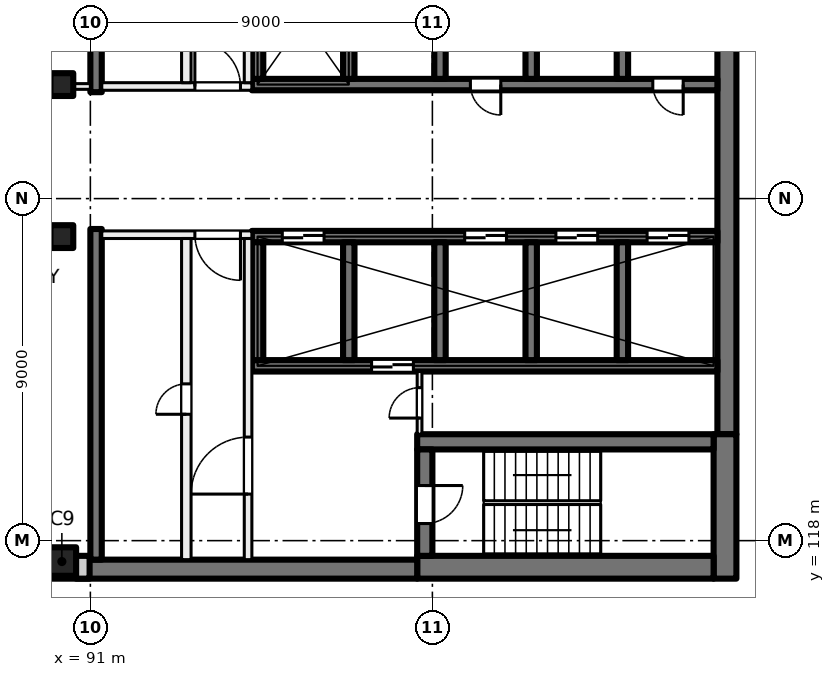
"""IFC4 building model, lengths in metres.
Left out: names, types, materials, properties, quantities, classifications, styles, units other than length and angle.
Written with IfcOpenShell. Run it as: python <this file> out.ifc"""

import sys

from ifc_helpers import new_model, si_unit, direction, frame, frame_2d, origin, origin_2d, place, context, subcontext, project, spatial, rectangle, extrude, element, fill, save


model = new_model("IFC4")
c1 = context("Model", 3, precision=1e-05, world=origin(), true_north=direction((0.0, 1.0)))
c2 = subcontext(c1, "Body", "Model", "MODEL_VIEW")
j1 = project(units=[si_unit("LENGTHUNIT", "METRE"), si_unit("PLANEANGLEUNIT", "RADIAN")], contexts=[c1])
p1 = place(None, origin())
s1 = spatial("IfcSite", under=j1, at=p1, CompositionType="ELEMENT")
p2 = place(p1, origin())
s2 = spatial("IfcBuilding", under=s1, at=p2, CompositionType="ELEMENT")
p3 = place(p2, frame((0.0, 0.0, 204.0)))
s3 = spatial("IfcBuildingStorey", under=s2, at=p3, CompositionType="ELEMENT", Elevation=204.0)
for number, where, z_axis, x_axis in (
    (1, (90.25, 130.0, 0.0), (0.0, 0.0, 1.0), (1.0, 0.0, 0.0)),
    (2, (90.25, 126.0, 0.0), (0.0, 0.0, 1.0), (1.0, 0.0, 0.0)),
):
    element("IfcColumn", number, at=place(p3, frame(where, z_axis=z_axis, x_axis=x_axis)), inside=s3, PredefinedType="COLUMN", context=c2, shape_type="SweptSolid", body=[
        extrude(rectangle(XDim=0.6, YDim=0.6, at=origin_2d()), origin(), (0.0, 0.0, 1.0), 4.0),
    ])
p4 = place(p3, frame((90.25, 117.45, 0.0), z_axis=(0.0, 0.0, 1.0), x_axis=(1.0, 0.0, 0.0)))
e3 = element("IfcColumn", 3, at=p4, inside=s3, PredefinedType="COLUMN", context=c2, shape_type="SweptSolid", body=[
    extrude(rectangle(XDim=0.75, YDim=0.75, at=origin_2d()), origin(), (0.0, 0.0, 1.0), 4.0),
])
p5 = place(p3, frame((107.75, 135.2, 0.0), z_axis=(0.0, 0.0, 1.0), x_axis=(0.0, -1.0, 0.0)))
e4 = element("IfcWall", 4, at=p5, inside=s3, PredefinedType="SHEAR", context=c2, shape_type="SweptSolid", body=[
    extrude(rectangle(XDim=14.4, YDim=0.5, at=frame_2d((7.2, 0.0))), origin(), (0.0, 0.0, 1.0), 4.0),
])
p6 = place(p3, frame((107.7, 120.8, 0.0), z_axis=(0.0, 0.0, 1.0), x_axis=(0.0, -1.0, 0.0)))
e5 = element("IfcWall", 5, at=p6, inside=s3, PredefinedType="SHEAR", context=c2, shape_type="SweptSolid", body=[
    extrude(rectangle(XDim=3.8, YDim=0.6, at=frame_2d((1.9, 0.0))), origin(), (0.0, 0.0, 1.0), 4.0),
])
p7 = place(p3, frame((107.4, 117.3, 0.0), z_axis=(0.0, 0.0, 1.0), x_axis=(-1.0, 0.0, 0.0)))
e6 = element("IfcWall", 6, at=p7, inside=s3, PredefinedType="SHEAR", context=c2, shape_type="SweptSolid", body=[
    extrude(rectangle(XDim=7.8, YDim=0.6, at=frame_2d((3.9, 0.0))), origin(), (0.0, 0.0, 1.0), 4.0),
])
p8 = place(p3, frame((99.6, 117.25, 0.0), z_axis=(0.0, 0.0, 1.0), x_axis=(-1.0, 0.0, 0.0)))
e7 = element("IfcWall", 7, at=p8, inside=s3, PredefinedType="SHEAR", context=c2, shape_type="SweptSolid", body=[
    extrude(rectangle(XDim=8.975, YDim=0.5, at=frame_2d((4.488, 0.0))), origin(), (0.0, 0.0, 1.0), 4.0),
])
p9 = place(p3, frame((107.4, 120.6, 0.0), z_axis=(0.0, 0.0, 1.0), x_axis=(-1.0, 0.0, 0.0)))
e8 = element("IfcWall", 8, at=p9, inside=s3, PredefinedType="SHEAR", context=c2, shape_type="SweptSolid", body=[
    extrude(rectangle(XDim=7.8, YDim=0.4, at=frame_2d((3.9, 0.0))), origin(), (0.0, 0.0, 1.0), 4.0),
])
p10 = place(p3, frame((99.8, 120.4, 0.0), z_axis=(0.0, 0.0, 1.0), x_axis=(0.0, -1.0, 0.0)))
e9 = element("IfcWall", 9, at=p10, inside=s3, PredefinedType="SHEAR", context=c2, shape_type="SweptSolid", body=[
    extrude(rectangle(XDim=2.8, YDim=0.4, at=frame_2d((1.4, 0.0))), origin(), (0.0, 0.0, 1.0), 4.0),
])
p11 = place(p10, frame((0.95, 0.0, 0.0)))
e10 = element("IfcOpeningElement", 10, at=p11, cuts=e9, PredefinedType="OPENING", context=c2, shape_type="SweptSolid", body=[
    extrude(rectangle(XDim=1.0, YDim=2.1, at=frame_2d((0.5, 1.05))), frame((0.0, 0.21, 0.0), z_axis=(0.0, -1.0, 0.0), x_axis=(1.0, 0.0, 0.0)), (0.0, 0.0, 1.0), 0.42),
])
p12 = place(p3, frame((107.5, 130.0, 0.0), z_axis=(0.0, 0.0, 1.0), x_axis=(-1.0, 0.0, 0.0)))
e11 = element("IfcWall", 11, at=p12, inside=s3, PredefinedType="SHEAR", context=c2, shape_type="SweptSolid", body=[
    extrude(rectangle(XDim=12.25, YDim=0.3, at=frame_2d((6.125, 0.0))), origin(), (0.0, 0.0, 1.0), 4.0),
])
p13 = place(p12, frame((0.9, 0.0, 0.0)))
e12 = element("IfcOpeningElement", 12, at=p13, cuts=e11, PredefinedType="OPENING", context=c2, shape_type="SweptSolid", body=[
    extrude(rectangle(XDim=0.8, YDim=2.1, at=frame_2d((0.4, 1.05))), frame((0.0, 0.16, 0.0), z_axis=(0.0, -1.0, 0.0), x_axis=(1.0, 0.0, 0.0)), (0.0, 0.0, 1.0), 0.32),
])
p14 = place(p12, frame((5.7, 0.0, 0.0)))
e13 = element("IfcOpeningElement", 13, at=p14, cuts=e11, PredefinedType="OPENING", context=c2, shape_type="SweptSolid", body=[
    extrude(rectangle(XDim=0.8, YDim=2.1, at=frame_2d((0.4, 1.05))), frame((0.0, 0.16, 0.0), z_axis=(0.0, -1.0, 0.0), x_axis=(1.0, 0.0, 0.0)), (0.0, 0.0, 1.0), 0.32),
])
for number, where, z_axis, x_axis in (
    (14, (105.0, 133.25, 0.0), (0.0, 0.0, 1.0), (0.0, -1.0, 0.0)),
    (15, (102.6, 133.25, 0.0), (0.0, 0.0, 1.0), (0.0, -1.0, 0.0)),
    (16, (100.2, 133.25, 0.0), (0.0, 0.0, 1.0), (0.0, -1.0, 0.0)),
    (17, (97.8, 133.25, 0.0), (0.0, 0.0, 1.0), (0.0, -1.0, 0.0)),
    (18, (95.4, 133.25, 0.0), (0.0, 0.0, 1.0), (0.0, -1.0, 0.0)),
):
    element("IfcWall", number, at=place(p3, frame(where, z_axis=z_axis, x_axis=x_axis)), inside=s3, PredefinedType="SHEAR", context=c2, shape_type="SweptSolid", body=[
        extrude(rectangle(XDim=3.1, YDim=0.3, at=frame_2d((1.55, 0.0))), origin(), (0.0, 0.0, 1.0), 4.0),
    ])
p15 = place(p3, frame((107.5, 126.0, 0.0), z_axis=(0.0, 0.0, 1.0), x_axis=(-1.0, 0.0, 0.0)))
e19 = element("IfcWall", 19, at=p15, inside=s3, PredefinedType="SHEAR", context=c2, shape_type="SweptSolid", body=[
    extrude(rectangle(XDim=12.25, YDim=0.3, at=frame_2d((6.125, 0.0))), origin(), (0.0, 0.0, 1.0), 4.0),
])
p16 = place(p15, frame((0.75, 0.0, 0.0)))
e20 = element("IfcOpeningElement", 20, at=p16, cuts=e19, PredefinedType="OPENING", context=c2, shape_type="SweptSolid", body=[
    extrude(rectangle(XDim=1.1, YDim=2.1, at=frame_2d((0.55, 1.05))), frame((0.0, 0.16, 0.0), z_axis=(0.0, -1.0, 0.0), x_axis=(1.0, 0.0, 0.0)), (0.0, 0.0, 1.0), 0.32),
])
p17 = place(p15, frame((3.15, 0.0, 0.0)))
e21 = element("IfcOpeningElement", 21, at=p17, cuts=e19, PredefinedType="OPENING", context=c2, shape_type="SweptSolid", body=[
    extrude(rectangle(XDim=1.1, YDim=2.1, at=frame_2d((0.55, 1.05))), frame((0.0, 0.16, 0.0), z_axis=(0.0, -1.0, 0.0), x_axis=(1.0, 0.0, 0.0)), (0.0, 0.0, 1.0), 0.32),
])
p18 = place(p15, frame((5.55, 0.0, 0.0)))
e22 = element("IfcOpeningElement", 22, at=p18, cuts=e19, PredefinedType="OPENING", context=c2, shape_type="SweptSolid", body=[
    extrude(rectangle(XDim=1.1, YDim=2.1, at=frame_2d((0.55, 1.05))), frame((0.0, 0.16, 0.0), z_axis=(0.0, -1.0, 0.0), x_axis=(1.0, 0.0, 0.0)), (0.0, 0.0, 1.0), 0.32),
])
p19 = place(p15, frame((10.35, 0.0, 0.0)))
e23 = element("IfcOpeningElement", 23, at=p19, cuts=e19, PredefinedType="OPENING", context=c2, shape_type="SweptSolid", body=[
    extrude(rectangle(XDim=1.1, YDim=2.1, at=frame_2d((0.55, 1.05))), frame((0.0, 0.16, 0.0), z_axis=(0.0, -1.0, 0.0), x_axis=(1.0, 0.0, 0.0)), (0.0, 0.0, 1.0), 0.32),
])
p20 = place(p3, frame((107.5, 122.6, 0.0), z_axis=(0.0, 0.0, 1.0), x_axis=(-1.0, 0.0, 0.0)))
e24 = element("IfcWall", 24, at=p20, inside=s3, PredefinedType="SHEAR", context=c2, shape_type="SweptSolid", body=[
    extrude(rectangle(XDim=12.25, YDim=0.3, at=frame_2d((6.125, 0.0))), origin(), (0.0, 0.0, 1.0), 4.0),
])
p21 = place(p20, frame((8.0, 0.0, 0.0)))
e25 = element("IfcOpeningElement", 25, at=p21, cuts=e24, PredefinedType="OPENING", context=c2, shape_type="SweptSolid", body=[
    extrude(rectangle(XDim=1.1, YDim=2.1, at=frame_2d((0.55, 1.05))), frame((0.0, 0.16, 0.0), z_axis=(0.0, -1.0, 0.0), x_axis=(1.0, 0.0, 0.0)), (0.0, 0.0, 1.0), 0.32),
])
for number, where, z_axis, x_axis in (
    (26, (105.0, 125.85, 0.0), (0.0, 0.0, 1.0), (0.0, -1.0, 0.0)),
    (27, (102.6, 125.85, 0.0), (0.0, 0.0, 1.0), (0.0, -1.0, 0.0)),
    (28, (100.2, 125.85, 0.0), (0.0, 0.0, 1.0), (0.0, -1.0, 0.0)),
    (29, (97.8, 125.85, 0.0), (0.0, 0.0, 1.0), (0.0, -1.0, 0.0)),
    (30, (95.4, 125.85, 0.0), (0.0, 0.0, 1.0), (0.0, -1.0, 0.0)),
):
    element("IfcWall", number, at=place(p3, frame(where, z_axis=z_axis, x_axis=x_axis)), inside=s3, PredefinedType="SHEAR", context=c2, shape_type="SweptSolid", body=[
        extrude(rectangle(XDim=3.1, YDim=0.3, at=frame_2d((1.55, 0.0))), origin(), (0.0, 0.0, 1.0), 4.0),
    ])
for number, where, z_axis, x_axis in (
    (31, (91.15, 138.5, 0.0), (0.0, 0.0, 1.0), (0.0, -1.0, 0.0)),
    (32, (91.15, 126.2, 0.0), (0.0, 0.0, 1.0), (0.0, -1.0, 0.0)),
):
    element("IfcWall", number, at=place(p3, frame(where, z_axis=z_axis, x_axis=x_axis)), inside=s3, PredefinedType="SHEAR", context=c2, shape_type="SweptSolid", body=[
        extrude(rectangle(XDim=8.7, YDim=0.3, at=frame_2d((4.35, 0.0))), origin(), (0.0, 0.0, 1.0), 4.0),
    ])
p22 = place(p3, frame((90.98, 117.3, 0.0), z_axis=(0.0, 0.0, 1.0), x_axis=(-1.0, 0.0, 0.0)))
e33 = element("IfcWall", 33, at=p22, inside=s3, PredefinedType="SOLIDWALL", context=c2, shape_type="SweptSolid", body=[
    extrude(rectangle(XDim=33.745, YDim=0.6, at=frame_2d((16.873, 0.0))), origin(), (0.0, 0.0, 1.0), 3.625),
])
p23 = place(p22, frame((1.48, 0.0, 0.9)))
e34 = element("IfcOpeningElement", 34, at=p23, cuts=e33, PredefinedType="OPENING", context=c2, shape_type="SweptSolid", body=[
    extrude(rectangle(XDim=3.0, YDim=2.4, at=frame_2d((1.5, 1.2))), frame((0.0, 0.31, 0.0), z_axis=(0.0, -1.0, 0.0), x_axis=(1.0, 0.0, 0.0)), (0.0, 0.0, 1.0), 0.62),
])
p24 = place(p22, frame((5.98, 0.0, 0.9)))
e35 = element("IfcOpeningElement", 35, at=p24, cuts=e33, PredefinedType="OPENING", context=c2, shape_type="SweptSolid", body=[
    extrude(rectangle(XDim=3.0, YDim=2.4, at=frame_2d((1.5, 1.2))), frame((0.0, 0.31, 0.0), z_axis=(0.0, -1.0, 0.0), x_axis=(1.0, 0.0, 0.0)), (0.0, 0.0, 1.0), 0.62),
])
p25 = place(p22, frame((10.48, 0.0, 0.9)))
e36 = element("IfcOpeningElement", 36, at=p25, cuts=e33, PredefinedType="OPENING", context=c2, shape_type="SweptSolid", body=[
    extrude(rectangle(XDim=3.0, YDim=2.4, at=frame_2d((1.5, 1.2))), frame((0.0, 0.31, 0.0), z_axis=(0.0, -1.0, 0.0), x_axis=(1.0, 0.0, 0.0)), (0.0, 0.0, 1.0), 0.62),
])
p26 = place(p22, frame((14.98, 0.0, 0.9)))
e37 = element("IfcOpeningElement", 37, at=p26, cuts=e33, PredefinedType="OPENING", context=c2, shape_type="SweptSolid", body=[
    extrude(rectangle(XDim=3.0, YDim=2.4, at=frame_2d((1.5, 1.2))), frame((0.0, 0.31, 0.0), z_axis=(0.0, -1.0, 0.0), x_axis=(1.0, 0.0, 0.0)), (0.0, 0.0, 1.0), 0.62),
])
p27 = place(p22, frame((20.08, 0.0, 0.0)))
e38 = element("IfcOpeningElement", 38, at=p27, cuts=e33, PredefinedType="OPENING", context=c2, shape_type="SweptSolid", body=[
    extrude(rectangle(XDim=1.8, YDim=2.4, at=frame_2d((0.9, 1.2))), frame((0.0, 0.31, 0.0), z_axis=(0.0, -1.0, 0.0), x_axis=(1.0, 0.0, 0.0)), (0.0, 0.0, 1.0), 0.62),
])
p28 = place(p22, frame((23.98, 0.0, 0.9)))
e39 = element("IfcOpeningElement", 39, at=p28, cuts=e33, PredefinedType="OPENING", context=c2, shape_type="SweptSolid", body=[
    extrude(rectangle(XDim=3.0, YDim=2.4, at=frame_2d((1.5, 1.2))), frame((0.0, 0.31, 0.0), z_axis=(0.0, -1.0, 0.0), x_axis=(1.0, 0.0, 0.0)), (0.0, 0.0, 1.0), 0.62),
])
p29 = place(p22, frame((28.48, 0.0, 0.9)))
e40 = element("IfcOpeningElement", 40, at=p29, cuts=e33, PredefinedType="OPENING", context=c2, shape_type="SweptSolid", body=[
    extrude(rectangle(XDim=3.0, YDim=2.4, at=frame_2d((1.5, 1.2))), frame((0.0, 0.31, 0.0), z_axis=(0.0, -1.0, 0.0), x_axis=(1.0, 0.0, 0.0)), (0.0, 0.0, 1.0), 0.62),
])
p30 = place(p3, frame((95.25, 126.05, 0.0), z_axis=(0.0, 0.0, 1.0), x_axis=(-1.0, 0.0, 0.0)))
e41 = element("IfcWall", 41, at=p30, inside=s3, PredefinedType="PARTITIONING", context=c2, shape_type="SweptSolid", body=[
    extrude(rectangle(XDim=3.95, YDim=0.2, at=frame_2d((1.975, 0.0))), origin(), (0.0, 0.0, 1.0), 3.625),
])
p31 = place(p30, frame((0.3, 0.0, 0.0)))
e42 = element("IfcOpeningElement", 42, at=p31, cuts=e41, PredefinedType="OPENING", context=c2, shape_type="SweptSolid", body=[
    extrude(rectangle(XDim=1.2, YDim=2.1, at=frame_2d((0.6, 1.05))), frame((0.0, 0.11, 0.0), z_axis=(0.0, -1.0, 0.0), x_axis=(1.0, 0.0, 0.0)), (0.0, 0.0, 1.0), 0.22),
])
p32 = place(p3, frame((95.15, 117.5, 0.0), z_axis=(0.0, 0.0, 1.0), x_axis=(0.0, 1.0, 0.0)))
e43 = element("IfcWall", 43, at=p32, inside=s3, PredefinedType="PARTITIONING", context=c2, shape_type="SweptSolid", body=[
    extrude(rectangle(XDim=8.45, YDim=0.2, at=frame_2d((4.225, 0.0))), origin(), (0.0, 0.0, 1.0), 3.625),
])
p33 = place(p32, frame((1.725, 0.0, 0.0)))
e44 = element("IfcOpeningElement", 44, at=p33, cuts=e43, PredefinedType="OPENING", context=c2, shape_type="SweptSolid", body=[
    extrude(rectangle(XDim=1.5, YDim=2.1, at=frame_2d((0.75, 1.05))), frame((0.0, 0.11, 0.0), z_axis=(0.0, -1.0, 0.0), x_axis=(1.0, 0.0, 0.0)), (0.0, 0.0, 1.0), 0.22),
])
p34 = place(p3, frame((93.525, 117.5, 0.0), z_axis=(0.0, 0.0, 1.0), x_axis=(0.0, 1.0, 0.0)))
e45 = element("IfcWall", 45, at=p34, inside=s3, PredefinedType="PARTITIONING", context=c2, shape_type="SweptSolid", body=[
    extrude(rectangle(XDim=8.45, YDim=0.25, at=frame_2d((4.225, 0.0))), origin(), (0.0, 0.0, 1.0), 3.625),
])
p35 = place(p34, frame((3.825, 0.0, 0.0)))
e46 = element("IfcOpeningElement", 46, at=p35, cuts=e45, PredefinedType="OPENING", context=c2, shape_type="SweptSolid", body=[
    extrude(rectangle(XDim=0.8, YDim=2.1, at=frame_2d((0.4, 1.05))), frame((0.0, 0.135, 0.0), z_axis=(0.0, -1.0, 0.0), x_axis=(1.0, 0.0, 0.0)), (0.0, 0.0, 1.0), 0.27),
])
p36 = place(p3, frame((99.663, 120.8, 0.0), z_axis=(0.0, 0.0, 1.0), x_axis=(0.0, 1.0, 0.0)))
e47 = element("IfcWall", 47, at=p36, inside=s3, PredefinedType="PARTITIONING", context=c2, shape_type="SweptSolid", body=[
    extrude(rectangle(XDim=1.65, YDim=0.125, at=frame_2d((0.825, 0.0))), origin(), (0.0, 0.0, 1.0), 3.625),
])
p37 = place(p36, frame((0.425, 0.0, 0.0)))
e48 = element("IfcOpeningElement", 48, at=p37, cuts=e47, PredefinedType="OPENING", context=c2, shape_type="SweptSolid", body=[
    extrude(rectangle(XDim=0.8, YDim=2.1, at=frame_2d((0.4, 1.05))), frame((0.0, 0.073, 0.0), z_axis=(0.0, -1.0, 0.0), x_axis=(1.0, 0.0, 0.0)), (0.0, 0.0, 1.0), 0.145),
])
p38 = place(p3, frame((91.3, 129.95, 0.0), z_axis=(0.0, 0.0, 1.0), x_axis=(1.0, 0.0, 0.0)))
e49 = element("IfcWall", 49, at=p38, inside=s3, PredefinedType="PARTITIONING", context=c2, shape_type="SweptSolid", body=[
    extrude(rectangle(XDim=3.95, YDim=0.2, at=frame_2d((1.975, 0.0))), origin(), (0.0, 0.0, 1.0), 3.625),
])
p39 = place(p38, frame((2.45, 0.0, 0.0)))
e50 = element("IfcOpeningElement", 50, at=p39, cuts=e49, PredefinedType="OPENING", context=c2, shape_type="SweptSolid", body=[
    extrude(rectangle(XDim=1.2, YDim=2.1, at=frame_2d((0.6, 1.05))), frame((0.0, 0.11, 0.0), z_axis=(0.0, -1.0, 0.0), x_axis=(1.0, 0.0, 0.0)), (0.0, 0.0, 1.0), 0.22),
])
p40 = place(p3, frame((95.15, 130.05, 0.0), z_axis=(0.0, 0.0, 1.0), x_axis=(0.0, 1.0, 0.0)))
e51 = element("IfcWall", 51, at=p40, inside=s3, PredefinedType="PARTITIONING", context=c2, shape_type="SweptSolid", body=[
    extrude(rectangle(XDim=8.45, YDim=0.2, at=frame_2d((4.225, 0.0))), origin(), (0.0, 0.0, 1.0), 3.625),
])
p41 = place(p40, frame((5.225, 0.0, 0.0)))
e52 = element("IfcOpeningElement", 52, at=p41, cuts=e51, PredefinedType="OPENING", context=c2, shape_type="SweptSolid", body=[
    extrude(rectangle(XDim=1.5, YDim=2.1, at=frame_2d((0.75, 1.05))), frame((0.0, 0.11, 0.0), z_axis=(0.0, -1.0, 0.0), x_axis=(1.0, 0.0, 0.0)), (0.0, 0.0, 1.0), 0.22),
])
p42 = place(p3, frame((93.525, 130.05, 0.0), z_axis=(0.0, 0.0, 1.0), x_axis=(0.0, 1.0, 0.0)))
e53 = element("IfcWall", 53, at=p42, inside=s3, PredefinedType="PARTITIONING", context=c2, shape_type="SweptSolid", body=[
    extrude(rectangle(XDim=8.45, YDim=0.25, at=frame_2d((4.225, 0.0))), origin(), (0.0, 0.0, 1.0), 3.625),
])
p43 = place(p42, frame((3.825, 0.0, 0.0)))
e54 = element("IfcOpeningElement", 54, at=p43, cuts=e53, PredefinedType="OPENING", context=c2, shape_type="SweptSolid", body=[
    extrude(rectangle(XDim=0.8, YDim=2.1, at=frame_2d((0.4, 1.05))), frame((0.0, 0.135, 0.0), z_axis=(0.0, -1.0, 0.0), x_axis=(1.0, 0.0, 0.0)), (0.0, 0.0, 1.0), 0.27),
])
p44 = place(p3, frame((85.825, 129.95, 0.0), z_axis=(0.0, 0.0, 1.0), x_axis=(1.0, 0.0, 0.0)))
e55 = element("IfcWall", 55, at=p44, inside=s3, PredefinedType="PARTITIONING", context=c2, shape_type="SweptSolid", body=[
    extrude(rectangle(XDim=5.175, YDim=0.15, at=frame_2d((2.587, 0.0))), origin(), (0.0, 0.0, 1.0), 3.625),
])
p45 = place(p44, frame((2.077, 0.0, 0.0)))
e56 = element("IfcOpeningElement", 56, at=p45, cuts=e55, PredefinedType="OPENING", context=c2, shape_type="SweptSolid", body=[
    extrude(rectangle(XDim=1.0, YDim=2.1, at=frame_2d((0.5, 1.05))), frame((0.0, 0.085, 0.0), z_axis=(0.0, -1.0, 0.0), x_axis=(1.0, 0.0, 0.0)), (0.0, 0.0, 1.0), 0.17),
])
p46 = place(p16, origin())
e57 = element("IfcDoor", 57, at=p46, inside=s3, OperationType="DOUBLE_DOOR_SLIDING", PredefinedType="DOOR", context=c2, shape_type="SweptSolid", body=[
    extrude(rectangle(XDim=1.1, YDim=2.1, at=frame_2d((0.55, 1.05))), frame((0.0, 0.025, 0.0), z_axis=(0.0, -1.0, 0.0), x_axis=(1.0, 0.0, 0.0)), (0.0, 0.0, 1.0), 0.05),
])
fill(e20, e57)
p47 = place(p17, origin())
e58 = element("IfcDoor", 58, at=p47, inside=s3, OperationType="DOUBLE_DOOR_SLIDING", PredefinedType="DOOR", context=c2, shape_type="SweptSolid", body=[
    extrude(rectangle(XDim=1.1, YDim=2.1, at=frame_2d((0.55, 1.05))), frame((0.0, 0.025, 0.0), z_axis=(0.0, -1.0, 0.0), x_axis=(1.0, 0.0, 0.0)), (0.0, 0.0, 1.0), 0.05),
])
fill(e21, e58)
p48 = place(p18, origin())
e59 = element("IfcDoor", 59, at=p48, inside=s3, OperationType="DOUBLE_DOOR_SLIDING", PredefinedType="DOOR", context=c2, shape_type="SweptSolid", body=[
    extrude(rectangle(XDim=1.1, YDim=2.1, at=frame_2d((0.55, 1.05))), frame((0.0, 0.025, 0.0), z_axis=(0.0, -1.0, 0.0), x_axis=(1.0, 0.0, 0.0)), (0.0, 0.0, 1.0), 0.05),
])
fill(e22, e59)
p49 = place(p19, origin())
e60 = element("IfcDoor", 60, at=p49, inside=s3, OperationType="DOUBLE_DOOR_SLIDING", PredefinedType="DOOR", context=c2, shape_type="SweptSolid", body=[
    extrude(rectangle(XDim=1.1, YDim=2.1, at=frame_2d((0.55, 1.05))), frame((0.0, 0.025, 0.0), z_axis=(0.0, -1.0, 0.0), x_axis=(1.0, 0.0, 0.0)), (0.0, 0.0, 1.0), 0.05),
])
fill(e23, e60)
p50 = place(p13, origin())
e61 = element("IfcDoor", 61, at=p50, inside=s3, OperationType="SINGLE_SWING_LEFT", PredefinedType="DOOR", context=c2, shape_type="SweptSolid", body=[
    extrude(rectangle(XDim=0.8, YDim=2.1, at=frame_2d((0.4, 1.05))), frame((0.0, 0.025, 0.0), z_axis=(0.0, -1.0, 0.0), x_axis=(1.0, 0.0, 0.0)), (0.0, 0.0, 1.0), 0.05),
])
fill(e12, e61)
p51 = place(p14, origin())
e62 = element("IfcDoor", 62, at=p51, inside=s3, OperationType="SINGLE_SWING_RIGHT", PredefinedType="DOOR", context=c2, shape_type="SweptSolid", body=[
    extrude(rectangle(XDim=0.8, YDim=2.1, at=frame_2d((0.4, 1.05))), frame((0.0, 0.025, 0.0), z_axis=(0.0, -1.0, 0.0), x_axis=(1.0, 0.0, 0.0)), (0.0, 0.0, 1.0), 0.05),
])
fill(e13, e62)
p52 = place(p31, origin())
e63 = element("IfcDoor", 63, at=p52, inside=s3, OperationType="DOUBLE_DOOR_SINGLE_SWING", PredefinedType="DOOR", context=c2, shape_type="SweptSolid", body=[
    extrude(rectangle(XDim=1.2, YDim=2.1, at=frame_2d((0.6, 1.05))), frame((0.0, 0.025, 0.0), z_axis=(0.0, -1.0, 0.0), x_axis=(1.0, 0.0, 0.0)), (0.0, 0.0, 1.0), 0.05),
])
fill(e42, e63)
p53 = place(p33, origin())
e64 = element("IfcDoor", 64, at=p53, inside=s3, OperationType="DOUBLE_DOOR_SINGLE_SWING", PredefinedType="DOOR", context=c2, shape_type="SweptSolid", body=[
    extrude(rectangle(XDim=1.5, YDim=2.1, at=frame_2d((0.75, 1.05))), frame((0.0, 0.025, 0.0), z_axis=(0.0, -1.0, 0.0), x_axis=(1.0, 0.0, 0.0)), (0.0, 0.0, 1.0), 0.05),
])
fill(e44, e64)
p54 = place(p11, origin())
e65 = element("IfcDoor", 65, at=p54, inside=s3, OperationType="SINGLE_SWING_LEFT", PredefinedType="DOOR", context=c2, shape_type="SweptSolid", body=[
    extrude(rectangle(XDim=1.0, YDim=2.1, at=frame_2d((0.5, 1.05))), frame((0.0, 0.025, 0.0), z_axis=(0.0, -1.0, 0.0), x_axis=(1.0, 0.0, 0.0)), (0.0, 0.0, 1.0), 0.05),
])
fill(e10, e65)
p55 = place(p37, origin())
e66 = element("IfcDoor", 66, at=p55, inside=s3, OperationType="SINGLE_SWING_RIGHT", PredefinedType="DOOR", context=c2, shape_type="SweptSolid", body=[
    extrude(rectangle(XDim=0.8, YDim=2.1, at=frame_2d((0.4, 1.05))), frame((0.0, 0.025, 0.0), z_axis=(0.0, -1.0, 0.0), x_axis=(1.0, 0.0, 0.0)), (0.0, 0.0, 1.0), 0.05),
])
fill(e48, e66)
p56 = place(p35, origin())
e67 = element("IfcDoor", 67, at=p56, inside=s3, OperationType="SINGLE_SWING_LEFT", PredefinedType="DOOR", context=c2, shape_type="SweptSolid", body=[
    extrude(rectangle(XDim=0.8, YDim=2.1, at=frame_2d((0.4, 1.05))), frame((0.0, 0.025, 0.0), z_axis=(0.0, -1.0, 0.0), x_axis=(1.0, 0.0, 0.0)), (0.0, 0.0, 1.0), 0.05),
])
fill(e46, e67)
p57 = place(p39, origin())
e68 = element("IfcDoor", 68, at=p57, inside=s3, OperationType="DOUBLE_DOOR_SINGLE_SWING", PredefinedType="DOOR", context=c2, shape_type="SweptSolid", body=[
    extrude(rectangle(XDim=1.2, YDim=2.1, at=frame_2d((0.6, 1.05))), frame((0.0, 0.025, 0.0), z_axis=(0.0, -1.0, 0.0), x_axis=(1.0, 0.0, 0.0)), (0.0, 0.0, 1.0), 0.05),
])
fill(e50, e68)
p58 = place(p21, origin())
e69 = element("IfcDoor", 69, at=p58, inside=s3, OperationType="DOUBLE_DOOR_SLIDING", PredefinedType="DOOR", context=c2, shape_type="SweptSolid", body=[
    extrude(rectangle(XDim=1.1, YDim=2.1, at=frame_2d((0.55, 1.05))), frame((0.0, 0.025, 0.0), z_axis=(0.0, -1.0, 0.0), x_axis=(1.0, 0.0, 0.0)), (0.0, 0.0, 1.0), 0.05),
])
fill(e25, e69)
save(model, sys.argv[1])
